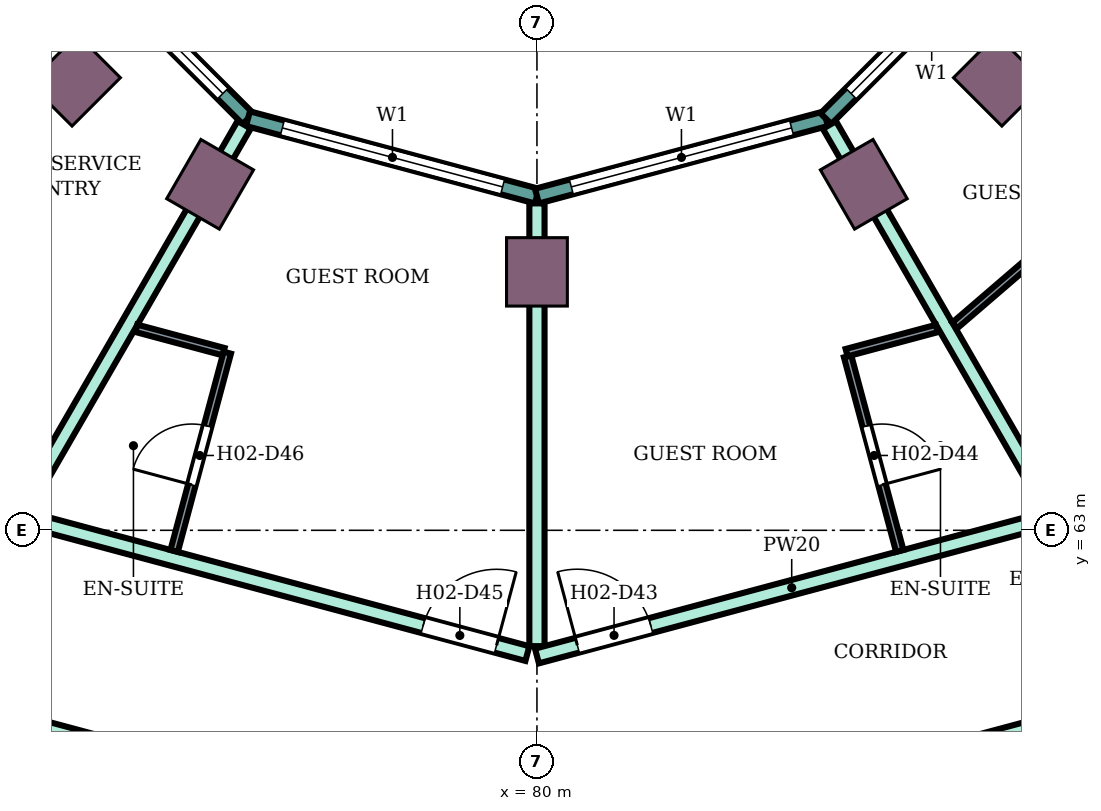
"""IFC4 building model, lengths in metres.
Left out: names, types, materials, properties, quantities, classifications, styles, units other than length and angle.
Written with IfcOpenShell. Run it as: python <this file> out.ifc"""

import sys

from ifc_helpers import new_model, si_unit, direction, frame, frame_2d, origin, origin_2d, place, context, subcontext, project, spatial, rectangle, extrude, element, fill, save


model = new_model("IFC4")
c1 = context("Model", 3, precision=1e-05, world=origin(), true_north=direction((0.0, 1.0)))
c2 = subcontext(c1, "Body", "Model", "MODEL_VIEW")
j1 = project(units=[si_unit("LENGTHUNIT", "METRE"), si_unit("PLANEANGLEUNIT", "RADIAN")], contexts=[c1])
p1 = place(None, origin())
s1 = spatial("IfcSite", under=j1, at=p1, CompositionType="ELEMENT")
p2 = place(p1, origin())
s2 = spatial("IfcBuilding", under=s1, at=p2, CompositionType="ELEMENT")
p3 = place(p2, frame((0.0, 0.0, 40.2)))
s3 = spatial("IfcBuildingStorey", under=s2, at=p3, CompositionType="ELEMENT", Elevation=40.2)
for number, where, z_axis, x_axis in (
    (1, (73.919, 68.919, 0.0), (0.0, 0.0, 1.0), (-0.707, -0.707, 0.0)),
    (2, (75.7, 67.552, 0.0), (0.0, 0.0, 1.0), (-0.5, -0.866, 0.0)),
    (3, (80.0, 66.4, 0.0), (0.0, 0.0, 1.0), (0.0, -1.0, 0.0)),
    (4, (84.3, 67.552, 0.0), (0.0, 0.0, 1.0), (0.5, -0.866, 0.0)),
    (5, (86.081, 68.919, 0.0), (0.0, 0.0, 1.0), (0.707, -0.707, 0.0)),
):
    element("IfcColumn", number, at=place(p3, frame(where, z_axis=z_axis, x_axis=x_axis)), inside=s3, PredefinedType="COLUMN", context=c2, shape_type="SweptSolid", body=[
        extrude(rectangle(XDim=0.9, YDim=0.8, at=origin_2d()), origin(), (0.0, 0.0, 1.0), 3.8),
    ])
p4 = place(p3, frame((73.415, 71.198, 0.0), z_axis=(0.0, 0.0, 1.0), x_axis=(0.707106781187, -0.707106781187, 0.0)))
e6 = element("IfcWall", 6, at=p4, inside=s3, PredefinedType="NOTDEFINED", context=c2, shape_type="SweptSolid", body=[
    extrude(rectangle(XDim=3.936, YDim=0.2, at=frame_2d((1.968, 0.0))), origin(), (0.0, 0.0, 1.0), 3.8),
])
p5 = place(p4, frame((0.468, 0.0, 0.9)))
e7 = element("IfcOpeningElement", 7, at=p5, cuts=e6, PredefinedType="OPENING", context=c2, shape_type="SweptSolid", body=[
    extrude(rectangle(XDim=3.0, YDim=2.3, at=frame_2d((1.5, 1.15))), frame((0.0, 0.11, 0.0), z_axis=(0.0, -1.0, 0.0), x_axis=(1.0, 0.0, 0.0)), (0.0, 0.0, 1.0), 0.22),
])
p6 = place(p3, frame((76.198, 68.415, 0.0), z_axis=(0.0, 0.0, 1.0), x_axis=(0.965933654434, -0.258789828301, 0.0)))
e8 = element("IfcWall", 8, at=p6, inside=s3, PredefinedType="NOTDEFINED", context=c2, shape_type="SweptSolid", body=[
    extrude(rectangle(XDim=3.936, YDim=0.2, at=frame_2d((1.968, 0.0))), origin(), (0.0, 0.0, 1.0), 3.8),
])
p7 = place(p6, frame((0.468, 0.0, 0.9)))
e9 = element("IfcOpeningElement", 9, at=p7, cuts=e8, PredefinedType="OPENING", context=c2, shape_type="SweptSolid", body=[
    extrude(rectangle(XDim=3.0, YDim=2.3, at=frame_2d((1.5, 1.15))), frame((0.0, 0.11, 0.0), z_axis=(0.0, -1.0, 0.0), x_axis=(1.0, 0.0, 0.0)), (0.0, 0.0, 1.0), 0.22),
])
p8 = place(p3, frame((80.0, 67.396, 0.0), z_axis=(0.0, 0.0, 1.0), x_axis=(0.965933654434, 0.258789828301, 0.0)))
e10 = element("IfcWall", 10, at=p8, inside=s3, PredefinedType="NOTDEFINED", context=c2, shape_type="SweptSolid", body=[
    extrude(rectangle(XDim=3.936, YDim=0.2, at=frame_2d((1.968, 0.0))), origin(), (0.0, 0.0, 1.0), 3.8),
])
p9 = place(p8, frame((0.468, 0.0, 0.9)))
e11 = element("IfcOpeningElement", 11, at=p9, cuts=e10, PredefinedType="OPENING", context=c2, shape_type="SweptSolid", body=[
    extrude(rectangle(XDim=3.0, YDim=2.3, at=frame_2d((1.5, 1.15))), frame((0.0, 0.11, 0.0), z_axis=(0.0, -1.0, 0.0), x_axis=(1.0, 0.0, 0.0)), (0.0, 0.0, 1.0), 0.22),
])
p10 = place(p3, frame((83.802, 68.415, 0.0), z_axis=(0.0, 0.0, 1.0), x_axis=(0.707106781187, 0.707106781187, 0.0)))
e12 = element("IfcWall", 12, at=p10, inside=s3, PredefinedType="NOTDEFINED", context=c2, shape_type="SweptSolid", body=[
    extrude(rectangle(XDim=3.936, YDim=0.2, at=frame_2d((1.968, 0.0))), origin(), (0.0, 0.0, 1.0), 3.8),
])
p11 = place(p10, frame((0.468, 0.0, 0.9)))
e13 = element("IfcOpeningElement", 13, at=p11, cuts=e12, PredefinedType="OPENING", context=c2, shape_type="SweptSolid", body=[
    extrude(rectangle(XDim=3.0, YDim=2.3, at=frame_2d((1.5, 1.15))), frame((0.0, 0.11, 0.0), z_axis=(0.0, -1.0, 0.0), x_axis=(1.0, 0.0, 0.0)), (0.0, 0.0, 1.0), 0.22),
])
p12 = place(p3, frame((71.877, 60.832, 0.0), z_axis=(0.0, 0.0, 1.0), x_axis=(0.965852509869, -0.259092510851, 0.0)))
e14 = element("IfcWall", 14, at=p12, inside=s3, PredefinedType="PARTITIONING", context=c2, shape_type="SweptSolid", body=[
    extrude(rectangle(XDim=8.32, YDim=0.2, at=frame_2d((4.16, 0.0))), origin(), (0.0, 0.0, 1.0), 3.35),
])
p13 = place(p12, frame((6.86, 0.0, 0.0)))
e15 = element("IfcOpeningElement", 15, at=p13, cuts=e14, PredefinedType="OPENING", context=c2, shape_type="SweptSolid", body=[
    extrude(rectangle(XDim=1.0, YDim=2.1, at=frame_2d((0.5, 1.05))), frame((0.0, 0.11, 0.0), z_axis=(0.0, -1.0, 0.0), x_axis=(1.0, 0.0, 0.0)), (0.0, 0.0, 1.0), 0.22),
])
p14 = place(p12, frame((0.55, 0.0, 0.0)))
e16 = element("IfcOpeningElement", 16, at=p14, cuts=e14, PredefinedType="OPENING", context=c2, shape_type="SweptSolid", body=[
    extrude(rectangle(XDim=1.0, YDim=2.1, at=frame_2d((0.5, 1.05))), frame((0.0, 0.11, 0.0), z_axis=(0.0, -1.0, 0.0), x_axis=(1.0, 0.0, 0.0)), (0.0, 0.0, 1.0), 0.22),
])
p15 = place(p3, frame((73.287, 63.145, 0.0), z_axis=(0.0, 0.0, 1.0), x_axis=(0.965854200194, -0.259086209526, 0.0)))
e17 = element("IfcWall", 17, at=p15, inside=s3, PredefinedType="PARTITIONING", context=c2, shape_type="SweptSolid", body=[
    extrude(rectangle(XDim=6.82, YDim=0.2, at=frame_2d((3.41, 0.0))), origin(), (0.0, 0.0, 1.0), 3.35),
])
p16 = place(p15, frame((5.4, 0.0, 0.0)))
e18 = element("IfcOpeningElement", 18, at=p16, cuts=e17, PredefinedType="OPENING", context=c2, shape_type="SweptSolid", body=[
    extrude(rectangle(XDim=1.0, YDim=2.1, at=frame_2d((0.5, 1.05))), frame((0.0, 0.11, 0.0), z_axis=(0.0, -1.0, 0.0), x_axis=(1.0, 0.0, 0.0)), (0.0, 0.0, 1.0), 0.22),
])
p17 = place(p3, frame((73.169, 63.178, 0.0), z_axis=(0.0, 0.0, 1.0), x_axis=(0.50020860964, 0.865904929448, 0.0)))
e19 = element("IfcWall", 19, at=p17, inside=s3, PredefinedType="PARTITIONING", context=c2, shape_type="SweptSolid", body=[
    extrude(rectangle(XDim=5.955, YDim=0.2, at=frame_2d((2.978, 0.0))), origin(), (0.0, 0.0, 1.0), 3.35),
])
p18 = place(p3, frame((80.0, 58.655, 0.0), z_axis=(0.0, 0.0, 1.0), x_axis=(0.965967338894, 0.258664068224, 0.0)))
e20 = element("IfcWall", 20, at=p18, inside=s3, PredefinedType="PARTITIONING", context=c2, shape_type="SweptSolid", body=[
    extrude(rectangle(XDim=8.36, YDim=0.2, at=frame_2d((4.18, 0.0))), origin(), (0.0, 0.0, 1.0), 3.35),
])
p19 = place(p18, frame((6.86, 0.0, 0.0)))
e21 = element("IfcOpeningElement", 21, at=p19, cuts=e20, PredefinedType="OPENING", context=c2, shape_type="SweptSolid", body=[
    extrude(rectangle(XDim=1.0, YDim=2.1, at=frame_2d((0.5, 1.05))), frame((0.0, 0.11, 0.0), z_axis=(0.0, -1.0, 0.0), x_axis=(1.0, 0.0, 0.0)), (0.0, 0.0, 1.0), 0.22),
])
p20 = place(p18, frame((1.675, 0.0, 0.0)))
e22 = element("IfcOpeningElement", 22, at=p20, cuts=e20, PredefinedType="OPENING", context=c2, shape_type="SweptSolid", body=[
    extrude(rectangle(XDim=0.9, YDim=2.1, at=frame_2d((0.45, 1.05))), frame((0.0, 0.11, 0.0), z_axis=(0.0, -1.0, 0.0), x_axis=(1.0, 0.0, 0.0)), (0.0, 0.0, 1.0), 0.22),
])
p21 = place(p3, frame((80.0, 61.476, 0.0), z_axis=(0.0, 0.0, 1.0), x_axis=(0.0, 1.0, 0.0)))
e23 = element("IfcWall", 23, at=p21, inside=s3, PredefinedType="PARTITIONING", context=c2, shape_type="SweptSolid", body=[
    extrude(rectangle(XDim=5.825, YDim=0.2, at=frame_2d((2.913, 0.0))), origin(), (0.0, 0.0, 1.0), 3.35),
])
p22 = place(p3, frame((80.0, 61.346, 0.0), z_axis=(0.0, 0.0, 1.0), x_axis=(0.965924181808, 0.258825182312, 0.0)))
e24 = element("IfcWall", 24, at=p22, inside=s3, PredefinedType="PARTITIONING", context=c2, shape_type="SweptSolid", body=[
    extrude(rectangle(XDim=6.94, YDim=0.2, at=frame_2d((3.47, 0.0))), origin(), (0.0, 0.0, 1.0), 3.35),
])
p23 = place(p22, frame((0.55, 0.0, 0.0)))
e25 = element("IfcOpeningElement", 25, at=p23, cuts=e24, PredefinedType="OPENING", context=c2, shape_type="SweptSolid", body=[
    extrude(rectangle(XDim=1.0, YDim=2.1, at=frame_2d((0.5, 1.05))), frame((0.0, 0.11, 0.0), z_axis=(0.0, -1.0, 0.0), x_axis=(1.0, 0.0, 0.0)), (0.0, 0.0, 1.0), 0.22),
])
p24 = place(p3, frame((83.848, 68.332, 0.0), z_axis=(0.0, 0.0, 1.0), x_axis=(0.499919778085, -0.866071714975, 0.0)))
e26 = element("IfcWall", 26, at=p24, inside=s3, PredefinedType="PARTITIONING", context=c2, shape_type="SweptSolid", body=[
    extrude(rectangle(XDim=5.855, YDim=0.2, at=frame_2d((2.927, 0.0))), origin(), (0.0, 0.0, 1.0), 3.35),
])
p25 = place(p3, frame((74.729, 65.657, 0.0), z_axis=(0.0, 0.0, 1.0), x_axis=(0.965948051503, -0.258736085224, 0.0)))
e27 = element("IfcWall", 27, at=p25, inside=s3, PredefinedType="PARTITIONING", context=c2, shape_type="SweptSolid", body=[
    extrude(rectangle(XDim=1.189, YDim=0.1, at=frame_2d((0.594, 0.0))), origin(), (0.0, 0.0, 1.0), 3.35),
])
p26 = place(p3, frame((75.227, 62.729, 0.0), z_axis=(0.0, 0.0, 1.0), x_axis=(0.258945475746, 0.965891940432, 0.0)))
e28 = element("IfcWall", 28, at=p26, inside=s3, PredefinedType="PARTITIONING", context=c2, shape_type="SweptSolid", body=[
    extrude(rectangle(XDim=2.7, YDim=0.1, at=frame_2d((1.35, 0.0))), origin(), (0.0, 0.0, 1.0), 3.35),
])
p27 = place(p26, frame((0.9, 0.0, 0.0)))
e29 = element("IfcOpeningElement", 29, at=p27, cuts=e28, PredefinedType="OPENING", context=c2, shape_type="SweptSolid", body=[
    extrude(rectangle(XDim=0.8, YDim=2.1, at=frame_2d((0.4, 1.05))), frame((0.0, 0.06, 0.0), z_axis=(0.0, -1.0, 0.0), x_axis=(1.0, 0.0, 0.0)), (0.0, 0.0, 1.0), 0.12),
])
p28 = place(p3, frame((84.087, 65.289, 0.0), z_axis=(0.0, 0.0, 1.0), x_axis=(0.258929459649, -0.965896234037, 0.0)))
e30 = element("IfcWall", 30, at=p28, inside=s3, PredefinedType="PARTITIONING", context=c2, shape_type="SweptSolid", body=[
    extrude(rectangle(XDim=2.65, YDim=0.1, at=frame_2d((1.325, 0.0))), origin(), (0.0, 0.0, 1.0), 3.35),
])
p29 = place(p28, frame((0.95, 0.0, 0.0)))
e31 = element("IfcOpeningElement", 31, at=p29, cuts=e30, PredefinedType="OPENING", context=c2, shape_type="SweptSolid", body=[
    extrude(rectangle(XDim=0.8, YDim=2.1, at=frame_2d((0.4, 1.05))), frame((0.0, 0.06, 0.0), z_axis=(0.0, -1.0, 0.0), x_axis=(1.0, 0.0, 0.0)), (0.0, 0.0, 1.0), 0.12),
])
p30 = place(p3, frame((84.074, 65.337, 0.0), z_axis=(0.0, 0.0, 1.0), x_axis=(0.965914351064, 0.258861867428, 0.0)))
e32 = element("IfcWall", 32, at=p30, inside=s3, PredefinedType="PARTITIONING", context=c2, shape_type="SweptSolid", body=[
    extrude(rectangle(XDim=1.229, YDim=0.1, at=frame_2d((0.615, 0.0))), origin(), (0.0, 0.0, 1.0), 3.35),
])
p31 = place(p3, frame((85.497, 65.696, 0.0), z_axis=(0.0, 0.0, 1.0), x_axis=(0.75817032582, 0.652056559698, 0.0)))
e33 = element("IfcWall", 33, at=p31, inside=s3, PredefinedType="PARTITIONING", context=c2, shape_type="SweptSolid", body=[
    extrude(rectangle(XDim=1.461, YDim=0.1, at=frame_2d((0.73, 0.0))), origin(), (0.0, 0.0, 1.0), 3.35),
])
p32 = place(p5, origin())
e34 = element("IfcWindow", 34, at=p32, inside=s3, PartitioningType="SINGLE_PANEL", PredefinedType="WINDOW", context=c2, shape_type="SweptSolid", body=[
    extrude(rectangle(XDim=3.0, YDim=2.3, at=frame_2d((1.5, 1.15))), frame((0.0, 0.03, 0.0), z_axis=(0.0, -1.0, 0.0), x_axis=(1.0, 0.0, 0.0)), (0.0, 0.0, 1.0), 0.06),
])
fill(e7, e34)
p33 = place(p7, origin())
e35 = element("IfcWindow", 35, at=p33, inside=s3, PartitioningType="SINGLE_PANEL", PredefinedType="WINDOW", context=c2, shape_type="SweptSolid", body=[
    extrude(rectangle(XDim=3.0, YDim=2.3, at=frame_2d((1.5, 1.15))), frame((0.0, 0.03, 0.0), z_axis=(0.0, -1.0, 0.0), x_axis=(1.0, 0.0, 0.0)), (0.0, 0.0, 1.0), 0.06),
])
fill(e9, e35)
p34 = place(p9, origin())
e36 = element("IfcWindow", 36, at=p34, inside=s3, PartitioningType="SINGLE_PANEL", PredefinedType="WINDOW", context=c2, shape_type="SweptSolid", body=[
    extrude(rectangle(XDim=3.0, YDim=2.3, at=frame_2d((1.5, 1.15))), frame((0.0, 0.03, 0.0), z_axis=(0.0, -1.0, 0.0), x_axis=(1.0, 0.0, 0.0)), (0.0, 0.0, 1.0), 0.06),
])
fill(e11, e36)
p35 = place(p11, origin())
e37 = element("IfcWindow", 37, at=p35, inside=s3, PartitioningType="SINGLE_PANEL", PredefinedType="WINDOW", context=c2, shape_type="SweptSolid", body=[
    extrude(rectangle(XDim=3.0, YDim=2.3, at=frame_2d((1.5, 1.15))), frame((0.0, 0.03, 0.0), z_axis=(0.0, -1.0, 0.0), x_axis=(1.0, 0.0, 0.0)), (0.0, 0.0, 1.0), 0.06),
])
fill(e13, e37)
p36 = place(p23, origin())
e38 = element("IfcDoor", 38, at=p36, inside=s3, OperationType="SINGLE_SWING_LEFT", PredefinedType="DOOR", context=c2, shape_type="SweptSolid", body=[
    extrude(rectangle(XDim=1.0, YDim=2.1, at=frame_2d((0.5, 1.05))), frame((0.0, 0.025, 0.0), z_axis=(0.0, -1.0, 0.0), x_axis=(1.0, 0.0, 0.0)), (0.0, 0.0, 1.0), 0.05),
])
fill(e25, e38)
p37 = place(p29, origin())
e39 = element("IfcDoor", 39, at=p37, inside=s3, OperationType="SINGLE_SWING_RIGHT", PredefinedType="DOOR", context=c2, shape_type="SweptSolid", body=[
    extrude(rectangle(XDim=0.8, YDim=2.1, at=frame_2d((0.4, 1.05))), frame((0.0, 0.025, 0.0), z_axis=(0.0, -1.0, 0.0), x_axis=(1.0, 0.0, 0.0)), (0.0, 0.0, 1.0), 0.05),
])
fill(e31, e39)
p38 = place(p16, origin())
e40 = element("IfcDoor", 40, at=p38, inside=s3, OperationType="SINGLE_SWING_RIGHT", PredefinedType="DOOR", context=c2, shape_type="SweptSolid", body=[
    extrude(rectangle(XDim=1.0, YDim=2.1, at=frame_2d((0.5, 1.05))), frame((0.0, 0.025, 0.0), z_axis=(0.0, -1.0, 0.0), x_axis=(1.0, 0.0, 0.0)), (0.0, 0.0, 1.0), 0.05),
])
fill(e18, e40)
p39 = place(p27, origin())
e41 = element("IfcDoor", 41, at=p39, inside=s3, OperationType="SINGLE_SWING_LEFT", PredefinedType="DOOR", context=c2, shape_type="SweptSolid", body=[
    extrude(rectangle(XDim=0.8, YDim=2.1, at=frame_2d((0.4, 1.05))), frame((0.0, 0.025, 0.0), z_axis=(0.0, -1.0, 0.0), x_axis=(1.0, 0.0, 0.0)), (0.0, 0.0, 1.0), 0.05),
])
fill(e29, e41)
save(model, sys.argv[1])
